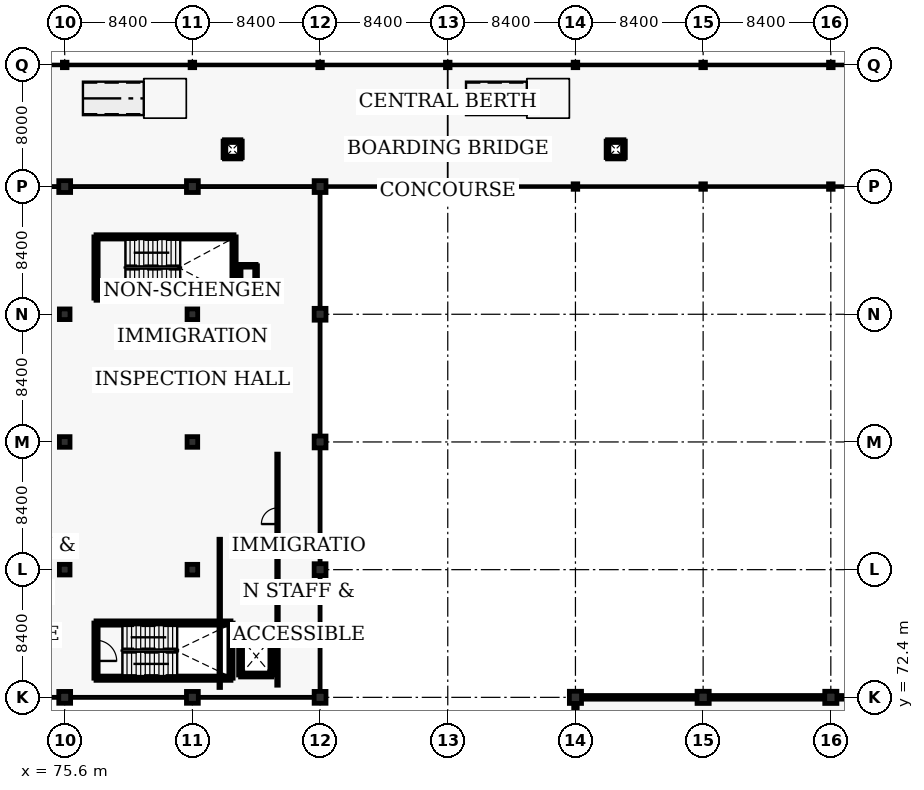
"""IFC4 building model, lengths in metres.
Left out: names, types, materials, properties, quantities, classifications, styles, units other than length and angle.
Written with IfcOpenShell. Run it as: python <this file> out.ifc"""

import sys

from ifc_helpers import new_model, si_unit, direction, frame, frame_2d, origin, origin_2d, place, context, subcontext, project, spatial, rectangle, circle, i_section, extrude, element, fill, save


model = new_model("IFC4")
c1 = context("Model", 3, precision=1e-05, world=origin(), true_north=direction((0.0, 1.0)))
c2 = subcontext(c1, "Body", "Model", "MODEL_VIEW")
j1 = project(units=[si_unit("LENGTHUNIT", "METRE"), si_unit("PLANEANGLEUNIT", "RADIAN")], contexts=[c1])
p1 = place(None, origin())
s1 = spatial("IfcSite", under=j1, at=p1, CompositionType="ELEMENT")
p2 = place(p1, origin())
s2 = spatial("IfcBuilding", under=s1, at=p2, CompositionType="ELEMENT")
p3 = place(p2, frame((0.0, 0.0, 5.44)))
s3 = spatial("IfcBuildingStorey", under=s2, at=p3, CompositionType="ELEMENT", Elevation=5.44)
p4 = place(p3, frame((75.6, 72.4, 0.0), z_axis=(0.0, 0.0, 1.0), x_axis=(1.0, 0.0, 0.0)))
e1 = element("IfcColumn", 1, at=p4, inside=s3, PredefinedType="COLUMN", context=c2, shape_type="SweptSolid", body=[
    extrude(circle(Radius=0.39, at=origin_2d()), origin(), (0.0, 0.0, 1.0), 4.16),
])
for number, where, z_axis, x_axis in (
    (2, (75.6, 80.8, 0.0), (0.0, 0.0, 1.0), (1.0, 0.0, 0.0)),
    (3, (75.6, 89.2, 0.0), (0.0, 0.0, 1.0), (1.0, 0.0, 0.0)),
    (4, (75.6, 97.6, 0.0), (0.0, 0.0, 1.0), (1.0, 0.0, 0.0)),
):
    element("IfcColumn", number, at=place(p3, frame(where, z_axis=z_axis, x_axis=x_axis)), inside=s3, PredefinedType="COLUMN", context=c2, shape_type="SweptSolid", body=[
        extrude(rectangle(XDim=0.7, YDim=0.7, at=origin_2d()), origin(), (0.0, 0.0, 1.0), 4.16),
    ])
for number, where, z_axis, x_axis in (
    (5, (75.6, 106.0, 0.0), (0.0, 0.0, 1.0), (1.0, 0.0, 0.0)),
    (6, (84.0, 72.4, 0.0), (0.0, 0.0, 1.0), (1.0, 0.0, 0.0)),
):
    element("IfcColumn", number, at=place(p3, frame(where, z_axis=z_axis, x_axis=x_axis)), inside=s3, PredefinedType="COLUMN", context=c2, shape_type="SweptSolid", body=[
        extrude(circle(Radius=0.39, at=origin_2d()), origin(), (0.0, 0.0, 1.0), 4.16),
    ])
for number, where, z_axis, x_axis in (
    (7, (84.0, 80.8, 0.0), (0.0, 0.0, 1.0), (1.0, 0.0, 0.0)),
    (8, (84.0, 89.2, 0.0), (0.0, 0.0, 1.0), (1.0, 0.0, 0.0)),
    (9, (84.0, 97.6, 0.0), (0.0, 0.0, 1.0), (1.0, 0.0, 0.0)),
):
    element("IfcColumn", number, at=place(p3, frame(where, z_axis=z_axis, x_axis=x_axis)), inside=s3, PredefinedType="COLUMN", context=c2, shape_type="SweptSolid", body=[
        extrude(rectangle(XDim=0.7, YDim=0.7, at=origin_2d()), origin(), (0.0, 0.0, 1.0), 4.16),
    ])
for number, where, z_axis, x_axis in (
    (10, (84.0, 106.0, 0.0), (0.0, 0.0, 1.0), (1.0, 0.0, 0.0)),
    (11, (92.4, 72.4, 0.0), (0.0, 0.0, 1.0), (1.0, 0.0, 0.0)),
    (12, (92.4, 80.8, 0.0), (0.0, 0.0, 1.0), (1.0, 0.0, 0.0)),
    (13, (92.4, 89.2, 0.0), (0.0, 0.0, 1.0), (1.0, 0.0, 0.0)),
    (14, (92.4, 97.6, 0.0), (0.0, 0.0, 1.0), (1.0, 0.0, 0.0)),
    (15, (92.4, 106.0, 0.0), (0.0, 0.0, 1.0), (1.0, 0.0, 0.0)),
):
    element("IfcColumn", number, at=place(p3, frame(where, z_axis=z_axis, x_axis=x_axis)), inside=s3, PredefinedType="COLUMN", context=c2, shape_type="SweptSolid", body=[
        extrude(circle(Radius=0.39, at=origin_2d()), origin(), (0.0, 0.0, 1.0), 4.16),
    ])
for number, where, z_axis, x_axis in (
    (16, (75.6, 114.0, 0.0), (0.0, 0.0, 1.0), (1.0, 0.0, 0.0)),
    (17, (84.0, 114.0, 0.0), (0.0, 0.0, 1.0), (1.0, 0.0, 0.0)),
    (18, (92.4, 114.0, 0.0), (0.0, 0.0, 1.0), (1.0, 0.0, 0.0)),
):
    element("IfcColumn", number, at=place(p3, frame(where, z_axis=z_axis, x_axis=x_axis)), inside=s3, PredefinedType="COLUMN", context=c2, shape_type="SweptSolid", body=[
        extrude(i_section(OverallWidth=0.3, OverallDepth=0.36, WebThickness=0.012, FlangeThickness=0.022, FilletRadius=0.027, at=origin_2d()), origin(), (0.0, 0.0, 1.0), 5.468),
    ])
p5 = place(p3, frame((100.8, 106.0, 0.0), z_axis=(0.0, 0.0, 1.0), x_axis=(1.0, 0.0, 0.0)))
e19 = element("IfcColumn", 19, at=p5, inside=s3, PredefinedType="COLUMN", context=c2, shape_type="SweptSolid", body=[
    extrude(i_section(OverallWidth=0.3, OverallDepth=0.36, WebThickness=0.012, FlangeThickness=0.022, FilletRadius=0.027, at=origin_2d()), origin(), (0.0, 0.0, 1.0), 3.84),
])
p6 = place(p3, frame((100.8, 114.0, 0.0), z_axis=(0.0, 0.0, 1.0), x_axis=(1.0, 0.0, 0.0)))
e20 = element("IfcColumn", 20, at=p6, inside=s3, PredefinedType="COLUMN", context=c2, shape_type="SweptSolid", body=[
    extrude(i_section(OverallWidth=0.3, OverallDepth=0.36, WebThickness=0.012, FlangeThickness=0.022, FilletRadius=0.027, at=origin_2d()), origin(), (0.0, 0.0, 1.0), 5.468),
])
p7 = place(p3, frame((109.2, 106.0, 0.0), z_axis=(0.0, 0.0, 1.0), x_axis=(1.0, 0.0, 0.0)))
e21 = element("IfcColumn", 21, at=p7, inside=s3, PredefinedType="COLUMN", context=c2, shape_type="SweptSolid", body=[
    extrude(i_section(OverallWidth=0.3, OverallDepth=0.36, WebThickness=0.012, FlangeThickness=0.022, FilletRadius=0.027, at=origin_2d()), origin(), (0.0, 0.0, 1.0), 3.84),
])
p8 = place(p3, frame((109.2, 114.0, 0.0), z_axis=(0.0, 0.0, 1.0), x_axis=(1.0, 0.0, 0.0)))
e22 = element("IfcColumn", 22, at=p8, inside=s3, PredefinedType="COLUMN", context=c2, shape_type="SweptSolid", body=[
    extrude(i_section(OverallWidth=0.3, OverallDepth=0.36, WebThickness=0.012, FlangeThickness=0.022, FilletRadius=0.027, at=origin_2d()), origin(), (0.0, 0.0, 1.0), 5.468),
])
p9 = place(p3, frame((117.6, 106.0, 0.0), z_axis=(0.0, 0.0, 1.0), x_axis=(1.0, 0.0, 0.0)))
e23 = element("IfcColumn", 23, at=p9, inside=s3, PredefinedType="COLUMN", context=c2, shape_type="SweptSolid", body=[
    extrude(i_section(OverallWidth=0.3, OverallDepth=0.36, WebThickness=0.012, FlangeThickness=0.022, FilletRadius=0.027, at=origin_2d()), origin(), (0.0, 0.0, 1.0), 3.84),
])
p10 = place(p3, frame((117.6, 114.0, 0.0), z_axis=(0.0, 0.0, 1.0), x_axis=(1.0, 0.0, 0.0)))
e24 = element("IfcColumn", 24, at=p10, inside=s3, PredefinedType="COLUMN", context=c2, shape_type="SweptSolid", body=[
    extrude(i_section(OverallWidth=0.3, OverallDepth=0.36, WebThickness=0.012, FlangeThickness=0.022, FilletRadius=0.027, at=origin_2d()), origin(), (0.0, 0.0, 1.0), 5.468),
])
p11 = place(p3, frame((126.0, 106.0, 0.0), z_axis=(0.0, 0.0, 1.0), x_axis=(1.0, 0.0, 0.0)))
e25 = element("IfcColumn", 25, at=p11, inside=s3, PredefinedType="COLUMN", context=c2, shape_type="SweptSolid", body=[
    extrude(i_section(OverallWidth=0.3, OverallDepth=0.36, WebThickness=0.012, FlangeThickness=0.022, FilletRadius=0.027, at=origin_2d()), origin(), (0.0, 0.0, 1.0), 3.84),
])
p12 = place(p3, frame((126.0, 114.0, 0.0), z_axis=(0.0, 0.0, 1.0), x_axis=(1.0, 0.0, 0.0)))
e26 = element("IfcColumn", 26, at=p12, inside=s3, PredefinedType="COLUMN", context=c2, shape_type="SweptSolid", body=[
    extrude(i_section(OverallWidth=0.3, OverallDepth=0.36, WebThickness=0.012, FlangeThickness=0.022, FilletRadius=0.027, at=origin_2d()), origin(), (0.0, 0.0, 1.0), 5.468),
])
for number, where, z_axis, x_axis in (
    (27, (109.2, 72.4, 0.0), (0.0, 0.0, 1.0), (1.0, 0.0, 0.0)),
    (28, (117.6, 72.4, 0.0), (0.0, 0.0, 1.0), (1.0, 0.0, 0.0)),
    (29, (126.0, 72.4, 0.0), (0.0, 0.0, 1.0), (1.0, 0.0, 0.0)),
):
    element("IfcColumn", number, at=place(p3, frame(where, z_axis=z_axis, x_axis=x_axis)), inside=s3, PredefinedType="COLUMN", context=c2, shape_type="SweptSolid", body=[
        extrude(rectangle(XDim=0.8, YDim=0.8, at=origin_2d()), origin(), (0.0, 0.0, 1.0), 4.16),
    ])
p13 = place(p3, frame((109.6, 72.4, 0.0), z_axis=(0.0, 0.0, 1.0), x_axis=(1.0, 0.0, 0.0)))
e30 = element("IfcWall", 30, at=p13, inside=s3, PredefinedType="PARAPET", context=c2, shape_type="SweptSolid", body=[
    extrude(rectangle(XDim=7.6, YDim=0.23, at=frame_2d((3.8, 0.0))), origin(), (0.0, 0.0, 1.0), 1.15),
])
for number, where, z_axis, x_axis in (
    (31, (118.0, 72.4, 0.0), (0.0, 0.0, 1.0), (1.0, 0.0, 0.0)),
    (32, (126.4, 72.4, 0.0), (0.0, 0.0, 1.0), (1.0, 0.0, 0.0)),
    (33, (109.2, 64.4, 0.0), (0.0, 0.0, 1.0), (0.0, 1.0, 0.0)),
):
    element("IfcWall", number, at=place(p3, frame(where, z_axis=z_axis, x_axis=x_axis)), inside=s3, PredefinedType="PARAPET", context=c2, shape_type="SweptSolid", body=[
        extrude(rectangle(XDim=7.6, YDim=0.23, at=frame_2d((3.8, 0.0))), origin(), (0.0, 0.0, 1.0), 1.15),
    ])
for number, where, z_axis, x_axis in (
    (34, (77.66, 73.66, 0.0), (0.0, 0.0, 1.0), (1.0, 0.0, 0.0)),
    (35, (77.66, 77.29, 0.0), (0.0, 0.0, 1.0), (1.0, 0.0, 0.0)),
):
    element("IfcWall", number, at=place(p3, frame(where, z_axis=z_axis, x_axis=x_axis)), inside=s3, PredefinedType="SHEAR", context=c2, shape_type="SweptSolid", body=[
        extrude(rectangle(XDim=8.88, YDim=0.28, at=frame_2d((4.44, 0.0))), origin(), (0.0, 0.0, 1.0), 4.16),
    ])
p14 = place(p3, frame((77.66, 77.29, 0.0), z_axis=(0.0, 0.0, 1.0), x_axis=(0.0, -1.0, 0.0)))
e36 = element("IfcWall", 36, at=p14, inside=s3, PredefinedType="SHEAR", context=c2, shape_type="SweptSolid", body=[
    extrude(rectangle(XDim=3.63, YDim=0.28, at=frame_2d((1.815, 0.0))), origin(), (0.0, 0.0, 1.0), 4.16),
])
p15 = place(p14, frame((1.135, 0.0, 0.0)))
e37 = element("IfcOpeningElement", 37, at=p15, cuts=e36, PredefinedType="OPENING", context=c2, shape_type="SweptSolid", body=[
    extrude(rectangle(XDim=1.36, YDim=2.15, at=frame_2d((0.68, 1.075))), frame((0.0, 0.15, 0.0), z_axis=(0.0, -1.0, 0.0), x_axis=(1.0, 0.0, 0.0)), (0.0, 0.0, 1.0), 0.3),
])
p16 = place(p3, frame((86.54, 73.66, 0.0), z_axis=(0.0, 0.0, 1.0), x_axis=(0.0, 1.0, 0.0)))
e38 = element("IfcWall", 38, at=p16, inside=s3, PredefinedType="SHEAR", context=c2, shape_type="SweptSolid", body=[
    extrude(rectangle(XDim=3.63, YDim=0.28, at=frame_2d((1.815, 0.0))), origin(), (0.0, 0.0, 1.0), 4.16),
])
p17 = place(p3, frame((87.17, 73.87, 0.0), z_axis=(0.0, 0.0, 1.0), x_axis=(1.0, 0.0, 0.0)))
e39 = element("IfcWall", 39, at=p17, inside=s3, PredefinedType="SHEAR", context=c2, shape_type="SweptSolid", body=[
    extrude(rectangle(XDim=2.06, YDim=0.26, at=frame_2d((1.03, 0.0))), origin(), (0.0, 0.0, 1.0), 4.16),
])
for number, where, z_axis, x_axis in (
    (40, (89.23, 73.87, 0.0), (0.0, 0.0, 1.0), (0.0, 1.0, 0.0)),
    (41, (87.17, 76.33, 0.0), (0.0, 0.0, 1.0), (0.0, -1.0, 0.0)),
):
    element("IfcWall", number, at=place(p3, frame(where, z_axis=z_axis, x_axis=x_axis)), inside=s3, PredefinedType="SHEAR", context=c2, shape_type="SweptSolid", body=[
        extrude(rectangle(XDim=2.46, YDim=0.26, at=frame_2d((1.23, 0.0))), origin(), (0.0, 0.0, 1.0), 4.16),
    ])
p18 = place(p3, frame((87.17, 76.33, 0.0), z_axis=(0.0, 0.0, 1.0), x_axis=(1.0, 0.0, 0.0)))
e42 = element("IfcWall", 42, at=p18, inside=s3, PredefinedType="SHEAR", context=c2, shape_type="SweptSolid", body=[
    extrude(rectangle(XDim=2.06, YDim=0.26, at=frame_2d((1.03, 0.0))), origin(), (0.0, 0.0, 1.0), 4.16),
])
p19 = place(p18, frame((0.46, 0.0, 0.0)))
e43 = element("IfcOpeningElement", 43, at=p19, cuts=e42, PredefinedType="OPENING", context=c2, shape_type="SweptSolid", body=[
    extrude(rectangle(XDim=1.14, YDim=2.14, at=frame_2d((0.57, 1.07))), frame((0.0, 0.14, 0.0), z_axis=(0.0, -1.0, 0.0), x_axis=(1.0, 0.0, 0.0)), (0.0, 0.0, 1.0), 0.28),
])
for number, where, z_axis, x_axis in (
    (44, (77.66, 98.66, 0.0), (0.0, 0.0, 1.0), (1.0, 0.0, 0.0)),
    (45, (77.66, 102.69, 0.0), (0.0, 0.0, 1.0), (1.0, 0.0, 0.0)),
):
    element("IfcWall", number, at=place(p3, frame(where, z_axis=z_axis, x_axis=x_axis)), inside=s3, PredefinedType="SHEAR", context=c2, shape_type="SweptSolid", body=[
        extrude(rectangle(XDim=9.08, YDim=0.28, at=frame_2d((4.54, 0.0))), origin(), (0.0, 0.0, 1.0), 4.16),
    ])
p20 = place(p3, frame((77.66, 102.69, 0.0), z_axis=(0.0, 0.0, 1.0), x_axis=(0.0, -1.0, 0.0)))
e46 = element("IfcWall", 46, at=p20, inside=s3, PredefinedType="SHEAR", context=c2, shape_type="SweptSolid", body=[
    extrude(rectangle(XDim=4.03, YDim=0.28, at=frame_2d((2.015, 0.0))), origin(), (0.0, 0.0, 1.0), 4.16),
])
p21 = place(p20, frame((1.035, 0.0, 0.0)))
e47 = element("IfcOpeningElement", 47, at=p21, cuts=e46, PredefinedType="OPENING", context=c2, shape_type="SweptSolid", body=[
    extrude(rectangle(XDim=1.96, YDim=2.22, at=frame_2d((0.98, 1.11))), frame((0.0, 0.15, 0.0), z_axis=(0.0, -1.0, 0.0), x_axis=(1.0, 0.0, 0.0)), (0.0, 0.0, 1.0), 0.3),
])
p22 = place(p3, frame((86.74, 98.66, 0.0), z_axis=(0.0, 0.0, 1.0), x_axis=(0.0, 1.0, 0.0)))
e48 = element("IfcWall", 48, at=p22, inside=s3, PredefinedType="SHEAR", context=c2, shape_type="SweptSolid", body=[
    extrude(rectangle(XDim=4.03, YDim=0.28, at=frame_2d((2.015, 0.0))), origin(), (0.0, 0.0, 1.0), 4.16),
])
p23 = place(p3, frame((86.11, 107.91, 0.0), z_axis=(0.0, 0.0, 1.0), x_axis=(1.0, 0.0, 0.0)))
e49 = element("IfcWall", 49, at=p23, inside=s3, PredefinedType="SOLIDWALL", context=c2, shape_type="SweptSolid", body=[
    extrude(rectangle(XDim=1.08, YDim=0.18, at=frame_2d((0.54, 0.0))), origin(), (0.0, 0.0, 1.0), 2.6),
])
p24 = place(p3, frame((87.19, 107.91, 0.0), z_axis=(0.0, 0.0, 1.0), x_axis=(0.0, 1.0, 0.0)))
e50 = element("IfcWall", 50, at=p24, inside=s3, PredefinedType="SOLIDWALL", context=c2, shape_type="SweptSolid", body=[
    extrude(rectangle(XDim=1.08, YDim=0.18, at=frame_2d((0.54, 0.0))), origin(), (0.0, 0.0, 1.0), 2.6),
])
p25 = place(p3, frame((87.19, 108.99, 0.0), z_axis=(0.0, 0.0, 1.0), x_axis=(-1.0, 0.0, 0.0)))
e51 = element("IfcWall", 51, at=p25, inside=s3, PredefinedType="SOLIDWALL", context=c2, shape_type="SweptSolid", body=[
    extrude(rectangle(XDim=1.08, YDim=0.18, at=frame_2d((0.54, 0.0))), origin(), (0.0, 0.0, 1.0), 2.6),
])
p26 = place(p3, frame((86.11, 108.99, 0.0), z_axis=(0.0, 0.0, 1.0), x_axis=(0.0, -1.0, 0.0)))
e52 = element("IfcWall", 52, at=p26, inside=s3, PredefinedType="SOLIDWALL", context=c2, shape_type="SweptSolid", body=[
    extrude(rectangle(XDim=1.08, YDim=0.18, at=frame_2d((0.54, 0.0))), origin(), (0.0, 0.0, 1.0), 2.6),
])
p27 = place(p3, frame((111.31, 107.91, 0.0), z_axis=(0.0, 0.0, 1.0), x_axis=(1.0, 0.0, 0.0)))
e53 = element("IfcWall", 53, at=p27, inside=s3, PredefinedType="SOLIDWALL", context=c2, shape_type="SweptSolid", body=[
    extrude(rectangle(XDim=1.08, YDim=0.18, at=frame_2d((0.54, 0.0))), origin(), (0.0, 0.0, 1.0), 2.6),
])
p28 = place(p3, frame((112.39, 107.91, 0.0), z_axis=(0.0, 0.0, 1.0), x_axis=(0.0, 1.0, 0.0)))
e54 = element("IfcWall", 54, at=p28, inside=s3, PredefinedType="SOLIDWALL", context=c2, shape_type="SweptSolid", body=[
    extrude(rectangle(XDim=1.08, YDim=0.18, at=frame_2d((0.54, 0.0))), origin(), (0.0, 0.0, 1.0), 2.6),
])
p29 = place(p3, frame((112.39, 108.99, 0.0), z_axis=(0.0, 0.0, 1.0), x_axis=(-1.0, 0.0, 0.0)))
e55 = element("IfcWall", 55, at=p29, inside=s3, PredefinedType="SOLIDWALL", context=c2, shape_type="SweptSolid", body=[
    extrude(rectangle(XDim=1.08, YDim=0.18, at=frame_2d((0.54, 0.0))), origin(), (0.0, 0.0, 1.0), 2.6),
])
p30 = place(p3, frame((111.31, 108.99, 0.0), z_axis=(0.0, 0.0, 1.0), x_axis=(0.0, -1.0, 0.0)))
e56 = element("IfcWall", 56, at=p30, inside=s3, PredefinedType="SOLIDWALL", context=c2, shape_type="SweptSolid", body=[
    extrude(rectangle(XDim=1.08, YDim=0.18, at=frame_2d((0.54, 0.0))), origin(), (0.0, 0.0, 1.0), 2.6),
])
p31 = place(p3, frame((87.11, 99.71, 0.0), z_axis=(0.0, 0.0, 1.0), x_axis=(1.0, 0.0, 0.0)))
e57 = element("IfcWall", 57, at=p31, inside=s3, PredefinedType="SOLIDWALL", context=c2, shape_type="SweptSolid", body=[
    extrude(rectangle(XDim=1.08, YDim=0.18, at=frame_2d((0.54, 0.0))), origin(), (0.0, 0.0, 1.0), 2.6),
])
p32 = place(p3, frame((88.19, 99.71, 0.0), z_axis=(0.0, 0.0, 1.0), x_axis=(0.0, 1.0, 0.0)))
e58 = element("IfcWall", 58, at=p32, inside=s3, PredefinedType="SOLIDWALL", context=c2, shape_type="SweptSolid", body=[
    extrude(rectangle(XDim=1.08, YDim=0.18, at=frame_2d((0.54, 0.0))), origin(), (0.0, 0.0, 1.0), 2.6),
])
p33 = place(p3, frame((88.19, 100.79, 0.0), z_axis=(0.0, 0.0, 1.0), x_axis=(-1.0, 0.0, 0.0)))
e59 = element("IfcWall", 59, at=p33, inside=s3, PredefinedType="SOLIDWALL", context=c2, shape_type="SweptSolid", body=[
    extrude(rectangle(XDim=1.08, YDim=0.18, at=frame_2d((0.54, 0.0))), origin(), (0.0, 0.0, 1.0), 2.6),
])
p34 = place(p3, frame((87.11, 100.79, 0.0), z_axis=(0.0, 0.0, 1.0), x_axis=(0.0, -1.0, 0.0)))
e60 = element("IfcWall", 60, at=p34, inside=s3, PredefinedType="SOLIDWALL", context=c2, shape_type="SweptSolid", body=[
    extrude(rectangle(XDim=1.08, YDim=0.18, at=frame_2d((0.54, 0.0))), origin(), (0.0, 0.0, 1.0), 2.6),
])
p35 = place(p3, frame((89.6, 73.2, 0.0), z_axis=(0.0, 0.0, 1.0), x_axis=(0.0, 1.0, 0.0)))
e61 = element("IfcWall", 61, at=p35, inside=s3, PredefinedType="PARTITIONING", context=c2, shape_type="SweptSolid", body=[
    extrude(rectangle(XDim=15.2, YDim=0.1, at=frame_2d((7.6, 0.0))), origin(), (0.0, 0.0, 1.0), 2.9),
])
p36 = place(p35, frame((10.6, 0.0, 0.0)))
e62 = element("IfcOpeningElement", 62, at=p36, cuts=e61, PredefinedType="OPENING", context=c2, shape_type="SweptSolid", body=[
    extrude(rectangle(XDim=1.06, YDim=2.1, at=frame_2d((0.53, 1.05))), frame((0.0, 0.06, 0.0), z_axis=(0.0, -1.0, 0.0), x_axis=(1.0, 0.0, 0.0)), (0.0, 0.0, 1.0), 0.12),
])
p37 = place(p3, frame((85.8, 73.05, 0.0), z_axis=(0.0, 0.0, 1.0), x_axis=(0.0, 1.0, 0.0)))
e63 = element("IfcWall", 63, at=p37, inside=s3, PredefinedType="PARTITIONING", context=c2, shape_type="SweptSolid", body=[
    extrude(rectangle(XDim=9.75, YDim=0.1, at=frame_2d((4.875, 0.0))), origin(), (0.0, 0.0, 1.0), 2.65),
])
p38 = place(p15, origin())
e64 = element("IfcDoor", 64, at=p38, inside=s3, OperationType="SINGLE_SWING_RIGHT", PredefinedType="DOOR", context=c2, shape_type="SweptSolid", body=[
    extrude(rectangle(XDim=1.36, YDim=2.15, at=frame_2d((0.68, 1.075))), frame((0.0, 0.025, 0.0), z_axis=(0.0, -1.0, 0.0), x_axis=(1.0, 0.0, 0.0)), (0.0, 0.0, 1.0), 0.05),
])
fill(e37, e64)
p39 = place(p19, origin())
e65 = element("IfcDoor", 65, at=p39, inside=s3, OperationType="DOUBLE_DOOR_SLIDING", PredefinedType="DOOR", context=c2, shape_type="SweptSolid", body=[
    extrude(rectangle(XDim=1.14, YDim=2.14, at=frame_2d((0.57, 1.07))), frame((0.0, 0.025, 0.0), z_axis=(0.0, -1.0, 0.0), x_axis=(1.0, 0.0, 0.0)), (0.0, 0.0, 1.0), 0.05),
])
fill(e43, e65)
p40 = place(p21, origin())
e66 = element("IfcDoor", 66, at=p40, inside=s3, OperationType="DOUBLE_DOOR_SLIDING", PredefinedType="DOOR", context=c2, shape_type="SweptSolid", body=[
    extrude(rectangle(XDim=1.96, YDim=2.22, at=frame_2d((0.98, 1.11))), frame((0.0, 0.025, 0.0), z_axis=(0.0, -1.0, 0.0), x_axis=(1.0, 0.0, 0.0)), (0.0, 0.0, 1.0), 0.05),
])
fill(e47, e66)
p41 = place(p36, origin())
e67 = element("IfcDoor", 67, at=p41, inside=s3, OperationType="SINGLE_SWING_LEFT", PredefinedType="DOOR", context=c2, shape_type="SweptSolid", body=[
    extrude(rectangle(XDim=1.06, YDim=2.1, at=frame_2d((0.53, 1.05))), frame((0.0, 0.025, 0.0), z_axis=(0.0, -1.0, 0.0), x_axis=(1.0, 0.0, 0.0)), (0.0, 0.0, 1.0), 0.05),
])
fill(e62, e67)
save(model, sys.argv[1])
